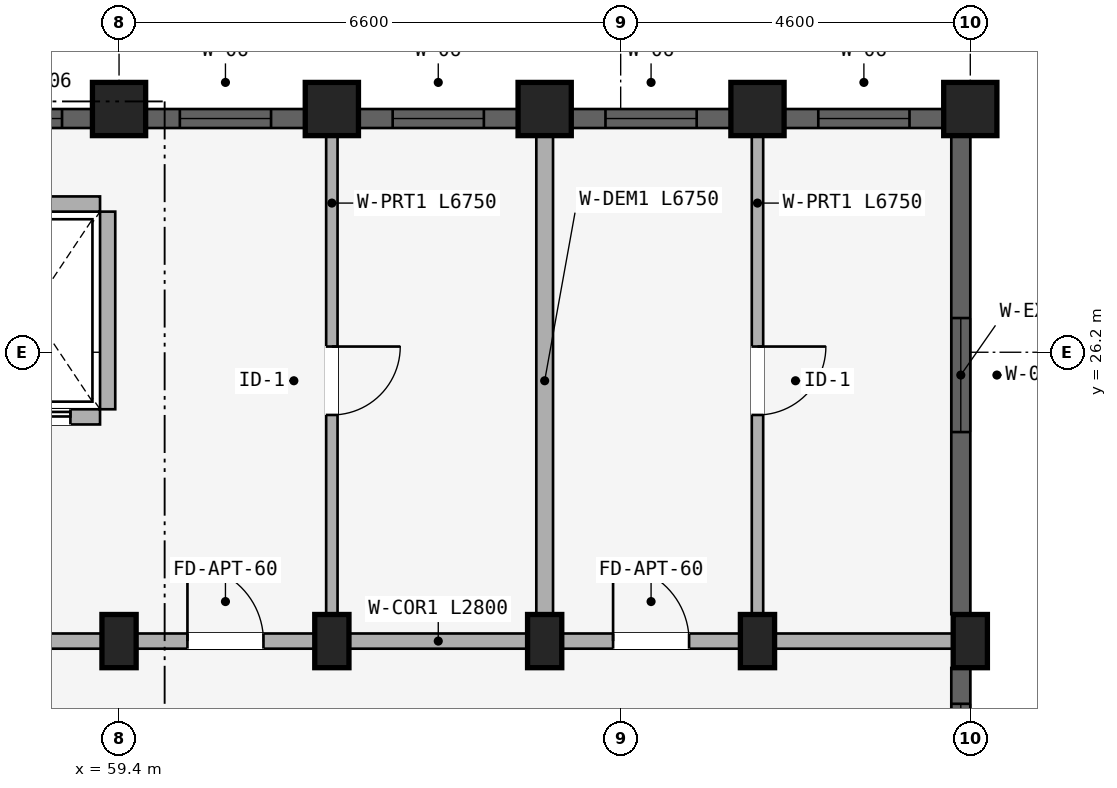
"""IFC4 building model, lengths in metres.
Left out: names, types, materials, properties, quantities, classifications, styles, units other than length and angle.
Written with IfcOpenShell. Run it as: python <this file> out.ifc"""

import sys

from ifc_helpers import new_model, si_unit, direction, frame, frame_2d, origin, origin_2d, place, context, subcontext, project, spatial, rectangle, extrude, element, fill, save


model = new_model("IFC4")
c1 = context("Model", 3, precision=1e-05, world=origin(), true_north=direction((0.0, 1.0)))
c2 = subcontext(c1, "Body", "Model", "MODEL_VIEW")
j1 = project(units=[si_unit("LENGTHUNIT", "METRE"), si_unit("PLANEANGLEUNIT", "RADIAN")], contexts=[c1])
p1 = place(None, origin())
s1 = spatial("IfcSite", under=j1, at=p1, CompositionType="ELEMENT")
p2 = place(p1, origin())
s2 = spatial("IfcBuilding", under=s1, at=p2, CompositionType="ELEMENT")
p3 = place(p2, frame((0.0, 0.0, 18.15)))
s3 = spatial("IfcBuildingStorey", under=s2, at=p3, CompositionType="ELEMENT", Elevation=18.15)
p4 = place(p3, frame((59.4, 29.4, 0.0), z_axis=(0.0, 0.0, 1.0), x_axis=(1.0, 0.0, 0.0)))
e1 = element("IfcColumn", 1, at=p4, inside=s3, PredefinedType="COLUMN", context=c2, shape_type="SweptSolid", body=[
    extrude(rectangle(XDim=0.7, YDim=0.7, at=origin_2d()), origin(), (0.0, 0.0, 1.0), 2.93),
])
p5 = place(p3, frame((59.4, 22.4, 0.0), z_axis=(0.0, 0.0, 1.0), x_axis=(1.0, 0.0, 0.0)))
e2 = element("IfcColumn", 2, at=p5, inside=s3, PredefinedType="COLUMN", context=c2, shape_type="SweptSolid", body=[
    extrude(rectangle(XDim=0.45, YDim=0.7, at=origin_2d()), origin(), (0.0, 0.0, 1.0), 2.93),
])
p6 = place(p3, frame((62.2, 29.4, 0.0), z_axis=(0.0, 0.0, 1.0), x_axis=(1.0, 0.0, 0.0)))
e3 = element("IfcColumn", 3, at=p6, inside=s3, PredefinedType="COLUMN", context=c2, shape_type="SweptSolid", body=[
    extrude(rectangle(XDim=0.7, YDim=0.7, at=origin_2d()), origin(), (0.0, 0.0, 1.0), 2.93),
])
p7 = place(p3, frame((62.2, 22.4, 0.0), z_axis=(0.0, 0.0, 1.0), x_axis=(1.0, 0.0, 0.0)))
e4 = element("IfcColumn", 4, at=p7, inside=s3, PredefinedType="COLUMN", context=c2, shape_type="SweptSolid", body=[
    extrude(rectangle(XDim=0.45, YDim=0.7, at=origin_2d()), origin(), (0.0, 0.0, 1.0), 2.93),
])
p8 = place(p3, frame((65.0, 29.4, 0.0), z_axis=(0.0, 0.0, 1.0), x_axis=(1.0, 0.0, 0.0)))
e5 = element("IfcColumn", 5, at=p8, inside=s3, PredefinedType="COLUMN", context=c2, shape_type="SweptSolid", body=[
    extrude(rectangle(XDim=0.7, YDim=0.7, at=origin_2d()), origin(), (0.0, 0.0, 1.0), 2.93),
])
p9 = place(p3, frame((65.0, 22.4, 0.0), z_axis=(0.0, 0.0, 1.0), x_axis=(1.0, 0.0, 0.0)))
e6 = element("IfcColumn", 6, at=p9, inside=s3, PredefinedType="COLUMN", context=c2, shape_type="SweptSolid", body=[
    extrude(rectangle(XDim=0.45, YDim=0.7, at=origin_2d()), origin(), (0.0, 0.0, 1.0), 2.93),
])
p10 = place(p3, frame((67.8, 29.4, 0.0), z_axis=(0.0, 0.0, 1.0), x_axis=(1.0, 0.0, 0.0)))
e7 = element("IfcColumn", 7, at=p10, inside=s3, PredefinedType="COLUMN", context=c2, shape_type="SweptSolid", body=[
    extrude(rectangle(XDim=0.7, YDim=0.7, at=origin_2d()), origin(), (0.0, 0.0, 1.0), 2.93),
])
p11 = place(p3, frame((67.8, 22.4, 0.0), z_axis=(0.0, 0.0, 1.0), x_axis=(1.0, 0.0, 0.0)))
e8 = element("IfcColumn", 8, at=p11, inside=s3, PredefinedType="COLUMN", context=c2, shape_type="SweptSolid", body=[
    extrude(rectangle(XDim=0.45, YDim=0.7, at=origin_2d()), origin(), (0.0, 0.0, 1.0), 2.93),
])
p12 = place(p3, frame((70.6, 29.4, 0.0), z_axis=(0.0, 0.0, 1.0), x_axis=(1.0, 0.0, 0.0)))
e9 = element("IfcColumn", 9, at=p12, inside=s3, PredefinedType="COLUMN", context=c2, shape_type="SweptSolid", body=[
    extrude(rectangle(XDim=0.7, YDim=0.7, at=origin_2d()), origin(), (0.0, 0.0, 1.0), 2.93),
])
p13 = place(p3, frame((70.6, 22.4, 0.0), z_axis=(0.0, 0.0, 1.0), x_axis=(1.0, 0.0, 0.0)))
e10 = element("IfcColumn", 10, at=p13, inside=s3, PredefinedType="COLUMN", context=c2, shape_type="SweptSolid", body=[
    extrude(rectangle(XDim=0.45, YDim=0.7, at=origin_2d()), origin(), (0.0, 0.0, 1.0), 2.93),
])
p14 = place(p3, frame((59.25, 28.05, 0.0), z_axis=(0.0, 0.0, 1.0), x_axis=(0.0, -1.0, 0.0)))
e11 = element("IfcWall", 11, at=p14, inside=s3, PredefinedType="STANDARD", context=c2, shape_type="SweptSolid", body=[
    extrude(rectangle(XDim=2.6, YDim=0.2, at=frame_2d((1.3, 0.0))), origin(), (0.0, 0.0, 1.0), 2.372),
])
p15 = place(p3, frame((57.35, 28.15, 0.0), z_axis=(0.0, 0.0, 1.0), x_axis=(1.0, 0.0, 0.0)))
e12 = element("IfcWall", 12, at=p15, inside=s3, PredefinedType="STANDARD", context=c2, shape_type="SweptSolid", body=[
    extrude(rectangle(XDim=1.8, YDim=0.2, at=frame_2d((0.9, 0.0))), origin(), (0.0, 0.0, 1.0), 2.93),
])
p16 = place(p3, frame((57.35, 25.35, 0.0), z_axis=(0.0, 0.0, 1.0), x_axis=(1.0, 0.0, 0.0)))
e13 = element("IfcWall", 13, at=p16, inside=s3, PredefinedType="STANDARD", context=c2, shape_type="SweptSolid", body=[
    extrude(rectangle(XDim=1.8, YDim=0.2, at=frame_2d((0.9, 0.0))), origin(), (0.0, 0.0, 1.0), 2.93),
])
p17 = place(p16, frame((0.39, 0.0, 0.0)))
e14 = element("IfcOpeningElement", 14, at=p17, cuts=e13, PredefinedType="OPENING", context=c2, shape_type="SweptSolid", body=[
    extrude(rectangle(XDim=1.02, YDim=2.15, at=frame_2d((0.51, 1.075))), frame((0.0, 0.11, 0.0), z_axis=(0.0, -1.0, 0.0), x_axis=(1.0, 0.0, 0.0)), (0.0, 0.0, 1.0), 0.22),
])
p18 = place(p3, frame((53.75, 22.4, 0.0), z_axis=(0.0, 0.0, 1.0), x_axis=(1.0, 0.0, 0.0)))
e15 = element("IfcWall", 15, at=p18, inside=s3, PredefinedType="STANDARD", context=c2, shape_type="SweptSolid", body=[
    extrude(rectangle(XDim=5.6, YDim=0.2, at=frame_2d((2.8, 0.0))), origin(), (0.0, 0.0, 1.0), 2.372),
])
p19 = place(p18, frame((1.91, 0.0, 0.0)))
e16 = element("IfcOpeningElement", 16, at=p19, cuts=e15, PredefinedType="OPENING", context=c2, shape_type="SweptSolid", body=[
    extrude(rectangle(XDim=1.22, YDim=2.15, at=frame_2d((0.61, 1.075))), frame((0.0, 0.11, 0.0), z_axis=(0.0, -1.0, 0.0), x_axis=(1.0, 0.0, 0.0)), (0.0, 0.0, 1.0), 0.22),
])
p20 = place(p3, frame((59.4, 22.4, 0.0), z_axis=(0.0, 0.0, 1.0), x_axis=(1.0, 0.0, 0.0)))
e17 = element("IfcWall", 17, at=p20, inside=s3, PredefinedType="STANDARD", context=c2, shape_type="SweptSolid", body=[
    extrude(rectangle(XDim=2.8, YDim=0.2, at=frame_2d((1.4, 0.0))), origin(), (0.0, 0.0, 1.0), 2.372),
])
p21 = place(p20, frame((0.9, 0.0, 0.0)))
e18 = element("IfcOpeningElement", 18, at=p21, cuts=e17, PredefinedType="OPENING", context=c2, shape_type="SweptSolid", body=[
    extrude(rectangle(XDim=1.0, YDim=2.15, at=frame_2d((0.5, 1.075))), frame((0.0, 0.11, 0.0), z_axis=(0.0, -1.0, 0.0), x_axis=(1.0, 0.0, 0.0)), (0.0, 0.0, 1.0), 0.22),
])
p22 = place(p3, frame((62.2, 22.4, 0.0), z_axis=(0.0, 0.0, 1.0), x_axis=(1.0, 0.0, 0.0)))
e19 = element("IfcWall", 19, at=p22, inside=s3, PredefinedType="STANDARD", context=c2, shape_type="SweptSolid", body=[
    extrude(rectangle(XDim=2.8, YDim=0.2, at=frame_2d((1.4, 0.0))), origin(), (0.0, 0.0, 1.0), 2.372),
])
p23 = place(p3, frame((65.0, 22.4, 0.0), z_axis=(0.0, 0.0, 1.0), x_axis=(1.0, 0.0, 0.0)))
e20 = element("IfcWall", 20, at=p23, inside=s3, PredefinedType="STANDARD", context=c2, shape_type="SweptSolid", body=[
    extrude(rectangle(XDim=2.8, YDim=0.2, at=frame_2d((1.4, 0.0))), origin(), (0.0, 0.0, 1.0), 2.372),
])
p24 = place(p23, frame((0.9, 0.0, 0.0)))
e21 = element("IfcOpeningElement", 21, at=p24, cuts=e20, PredefinedType="OPENING", context=c2, shape_type="SweptSolid", body=[
    extrude(rectangle(XDim=1.0, YDim=2.15, at=frame_2d((0.5, 1.075))), frame((0.0, 0.11, 0.0), z_axis=(0.0, -1.0, 0.0), x_axis=(1.0, 0.0, 0.0)), (0.0, 0.0, 1.0), 0.22),
])
p25 = place(p3, frame((67.8, 22.4, 0.0), z_axis=(0.0, 0.0, 1.0), x_axis=(1.0, 0.0, 0.0)))
e22 = element("IfcWall", 22, at=p25, inside=s3, PredefinedType="STANDARD", context=c2, shape_type="SweptSolid", body=[
    extrude(rectangle(XDim=2.8, YDim=0.2, at=frame_2d((1.4, 0.0))), origin(), (0.0, 0.0, 1.0), 2.372),
])
p26 = place(p3, frame((62.2, 29.2, 0.0), z_axis=(0.0, 0.0, 1.0), x_axis=(0.0, -1.0, 0.0)))
e23 = element("IfcWall", 23, at=p26, inside=s3, PredefinedType="PARTITIONING", context=c2, shape_type="SweptSolid", body=[
    extrude(rectangle(XDim=6.75, YDim=0.15, at=frame_2d((3.375, 0.0))), origin(), (0.0, 0.0, 1.0), 2.372),
])
p27 = place(p26, frame((2.925, 0.0, 0.0)))
e24 = element("IfcOpeningElement", 24, at=p27, cuts=e23, PredefinedType="OPENING", context=c2, shape_type="SweptSolid", body=[
    extrude(rectangle(XDim=0.9, YDim=2.1, at=frame_2d((0.45, 1.05))), frame((0.0, 0.085, 0.0), z_axis=(0.0, -1.0, 0.0), x_axis=(1.0, 0.0, 0.0)), (0.0, 0.0, 1.0), 0.17),
])
p28 = place(p3, frame((65.0, 29.2, 0.0), z_axis=(0.0, 0.0, 1.0), x_axis=(0.0, -1.0, 0.0)))
e25 = element("IfcWall", 25, at=p28, inside=s3, PredefinedType="STANDARD", context=c2, shape_type="SweptSolid", body=[
    extrude(rectangle(XDim=6.75, YDim=0.22, at=frame_2d((3.375, 0.0))), origin(), (0.0, 0.0, 1.0), 2.372),
])
p29 = place(p3, frame((67.8, 29.2, 0.0), z_axis=(0.0, 0.0, 1.0), x_axis=(0.0, -1.0, 0.0)))
e26 = element("IfcWall", 26, at=p29, inside=s3, PredefinedType="PARTITIONING", context=c2, shape_type="SweptSolid", body=[
    extrude(rectangle(XDim=6.75, YDim=0.15, at=frame_2d((3.375, 0.0))), origin(), (0.0, 0.0, 1.0), 2.372),
])
p30 = place(p29, frame((2.925, 0.0, 0.0)))
e27 = element("IfcOpeningElement", 27, at=p30, cuts=e26, PredefinedType="OPENING", context=c2, shape_type="SweptSolid", body=[
    extrude(rectangle(XDim=0.9, YDim=2.1, at=frame_2d((0.45, 1.05))), frame((0.0, 0.085, 0.0), z_axis=(0.0, -1.0, 0.0), x_axis=(1.0, 0.0, 0.0)), (0.0, 0.0, 1.0), 0.17),
])
p31 = place(p3, frame((56.628, 29.275, 0.0), z_axis=(0.0, 0.0, 1.0), x_axis=(1.0, 0.0, 0.0)))
e28 = element("IfcWall", 28, at=p31, inside=s3, PredefinedType="STANDARD", context=c2, shape_type="SweptSolid", body=[
    extrude(rectangle(XDim=2.422, YDim=0.25, at=frame_2d((1.211, 0.0))), origin(), (0.0, 0.0, 1.0), 2.472),
])
p32 = place(p31, frame((0.822, 0.0, 0.772)))
e29 = element("IfcOpeningElement", 29, at=p32, cuts=e28, PredefinedType="OPENING", context=c2, shape_type="SweptSolid", body=[
    extrude(rectangle(XDim=1.2, YDim=1.5, at=frame_2d((0.6, 0.75))), frame((0.0, 0.135, 0.0), z_axis=(0.0, -1.0, 0.0), x_axis=(1.0, 0.0, 0.0)), (0.0, 0.0, 1.0), 0.27),
])
p33 = place(p3, frame((59.753, 29.275, 0.0), z_axis=(0.0, 0.0, 1.0), x_axis=(1.0, 0.0, 0.0)))
e30 = element("IfcWall", 30, at=p33, inside=s3, PredefinedType="STANDARD", context=c2, shape_type="SweptSolid", body=[
    extrude(rectangle(XDim=2.093, YDim=0.25, at=frame_2d((1.046, 0.0))), origin(), (0.0, 0.0, 1.0), 2.472),
])
p34 = place(p33, frame((0.447, 0.0, 0.772)))
e31 = element("IfcOpeningElement", 31, at=p34, cuts=e30, PredefinedType="OPENING", context=c2, shape_type="SweptSolid", body=[
    extrude(rectangle(XDim=1.2, YDim=1.5, at=frame_2d((0.6, 0.75))), frame((0.0, 0.135, 0.0), z_axis=(0.0, -1.0, 0.0), x_axis=(1.0, 0.0, 0.0)), (0.0, 0.0, 1.0), 0.27),
])
p35 = place(p3, frame((62.553, 29.275, 0.0), z_axis=(0.0, 0.0, 1.0), x_axis=(1.0, 0.0, 0.0)))
e32 = element("IfcWall", 32, at=p35, inside=s3, PredefinedType="STANDARD", context=c2, shape_type="SweptSolid", body=[
    extrude(rectangle(XDim=2.093, YDim=0.25, at=frame_2d((1.046, 0.0))), origin(), (0.0, 0.0, 1.0), 2.472),
])
p36 = place(p35, frame((0.447, 0.0, 0.772)))
e33 = element("IfcOpeningElement", 33, at=p36, cuts=e32, PredefinedType="OPENING", context=c2, shape_type="SweptSolid", body=[
    extrude(rectangle(XDim=1.2, YDim=1.5, at=frame_2d((0.6, 0.75))), frame((0.0, 0.135, 0.0), z_axis=(0.0, -1.0, 0.0), x_axis=(1.0, 0.0, 0.0)), (0.0, 0.0, 1.0), 0.27),
])
p37 = place(p3, frame((65.354, 29.275, 0.0), z_axis=(0.0, 0.0, 1.0), x_axis=(1.0, 0.0, 0.0)))
e34 = element("IfcWall", 34, at=p37, inside=s3, PredefinedType="STANDARD", context=c2, shape_type="SweptSolid", body=[
    extrude(rectangle(XDim=2.093, YDim=0.25, at=frame_2d((1.046, 0.0))), origin(), (0.0, 0.0, 1.0), 2.472),
])
p38 = place(p37, frame((0.447, 0.0, 0.772)))
e35 = element("IfcOpeningElement", 35, at=p38, cuts=e34, PredefinedType="OPENING", context=c2, shape_type="SweptSolid", body=[
    extrude(rectangle(XDim=1.2, YDim=1.5, at=frame_2d((0.6, 0.75))), frame((0.0, 0.135, 0.0), z_axis=(0.0, -1.0, 0.0), x_axis=(1.0, 0.0, 0.0)), (0.0, 0.0, 1.0), 0.27),
])
p39 = place(p3, frame((68.154, 29.275, 0.0), z_axis=(0.0, 0.0, 1.0), x_axis=(1.0, 0.0, 0.0)))
e36 = element("IfcWall", 36, at=p39, inside=s3, PredefinedType="STANDARD", context=c2, shape_type="SweptSolid", body=[
    extrude(rectangle(XDim=2.093, YDim=0.25, at=frame_2d((1.046, 0.0))), origin(), (0.0, 0.0, 1.0), 2.472),
])
p40 = place(p39, frame((0.447, 0.0, 0.772)))
e37 = element("IfcOpeningElement", 37, at=p40, cuts=e36, PredefinedType="OPENING", context=c2, shape_type="SweptSolid", body=[
    extrude(rectangle(XDim=1.2, YDim=1.5, at=frame_2d((0.6, 0.75))), frame((0.0, 0.135, 0.0), z_axis=(0.0, -1.0, 0.0), x_axis=(1.0, 0.0, 0.0)), (0.0, 0.0, 1.0), 0.27),
])
p41 = place(p3, frame((70.475, 29.046, 0.0), z_axis=(0.0, 0.0, 1.0), x_axis=(0.0, -1.0, 0.0)))
e38 = element("IfcWall", 38, at=p41, inside=s3, PredefinedType="STANDARD", context=c2, shape_type="SweptSolid", body=[
    extrude(rectangle(XDim=6.293, YDim=0.25, at=frame_2d((3.146, 0.0))), origin(), (0.0, 0.0, 1.0), 2.372),
])
p42 = place(p41, frame((2.396, 0.0, 0.522)))
e39 = element("IfcOpeningElement", 39, at=p42, cuts=e38, PredefinedType="OPENING", context=c2, shape_type="SweptSolid", body=[
    extrude(rectangle(XDim=1.5, YDim=1.65, at=frame_2d((0.75, 0.825))), frame((0.0, 0.135, 0.0), z_axis=(0.0, -1.0, 0.0), x_axis=(1.0, 0.0, 0.0)), (0.0, 0.0, 1.0), 0.27),
])
p43 = place(p3, frame((70.475, 22.046, 0.0), z_axis=(0.0, 0.0, 1.0), x_axis=(0.0, -1.0, 0.0)))
e40 = element("IfcWall", 40, at=p43, inside=s3, PredefinedType="STANDARD", context=c2, shape_type="SweptSolid", body=[
    extrude(rectangle(XDim=1.693, YDim=0.25, at=frame_2d((0.846, 0.0))), origin(), (0.0, 0.0, 1.0), 2.372),
])
p44 = place(p43, frame((0.471, 0.0, 0.88)))
e41 = element("IfcOpeningElement", 41, at=p44, cuts=e40, PredefinedType="OPENING", context=c2, shape_type="SweptSolid", body=[
    extrude(rectangle(XDim=0.75, YDim=1.05, at=frame_2d((0.375, 0.525))), frame((0.0, 0.135, 0.0), z_axis=(0.0, -1.0, 0.0), x_axis=(1.0, 0.0, 0.0)), (0.0, 0.0, 1.0), 0.27),
])
p45 = place(p32, origin())
e42 = element("IfcWindow", 42, at=p45, inside=s3, PartitioningType="SINGLE_PANEL", PredefinedType="WINDOW", context=c2, shape_type="SweptSolid", body=[
    extrude(rectangle(XDim=1.2, YDim=1.5, at=frame_2d((0.6, 0.75))), frame((0.0, 0.03, 0.0), z_axis=(0.0, -1.0, 0.0), x_axis=(1.0, 0.0, 0.0)), (0.0, 0.0, 1.0), 0.06),
])
fill(e29, e42)
p46 = place(p34, origin())
e43 = element("IfcWindow", 43, at=p46, inside=s3, PartitioningType="SINGLE_PANEL", PredefinedType="WINDOW", context=c2, shape_type="SweptSolid", body=[
    extrude(rectangle(XDim=1.2, YDim=1.5, at=frame_2d((0.6, 0.75))), frame((0.0, 0.03, 0.0), z_axis=(0.0, -1.0, 0.0), x_axis=(1.0, 0.0, 0.0)), (0.0, 0.0, 1.0), 0.06),
])
fill(e31, e43)
p47 = place(p36, origin())
e44 = element("IfcWindow", 44, at=p47, inside=s3, PartitioningType="SINGLE_PANEL", PredefinedType="WINDOW", context=c2, shape_type="SweptSolid", body=[
    extrude(rectangle(XDim=1.2, YDim=1.5, at=frame_2d((0.6, 0.75))), frame((0.0, 0.03, 0.0), z_axis=(0.0, -1.0, 0.0), x_axis=(1.0, 0.0, 0.0)), (0.0, 0.0, 1.0), 0.06),
])
fill(e33, e44)
p48 = place(p38, origin())
e45 = element("IfcWindow", 45, at=p48, inside=s3, PartitioningType="SINGLE_PANEL", PredefinedType="WINDOW", context=c2, shape_type="SweptSolid", body=[
    extrude(rectangle(XDim=1.2, YDim=1.5, at=frame_2d((0.6, 0.75))), frame((0.0, 0.03, 0.0), z_axis=(0.0, -1.0, 0.0), x_axis=(1.0, 0.0, 0.0)), (0.0, 0.0, 1.0), 0.06),
])
fill(e35, e45)
p49 = place(p40, origin())
e46 = element("IfcWindow", 46, at=p49, inside=s3, PartitioningType="SINGLE_PANEL", PredefinedType="WINDOW", context=c2, shape_type="SweptSolid", body=[
    extrude(rectangle(XDim=1.2, YDim=1.5, at=frame_2d((0.6, 0.75))), frame((0.0, 0.03, 0.0), z_axis=(0.0, -1.0, 0.0), x_axis=(1.0, 0.0, 0.0)), (0.0, 0.0, 1.0), 0.06),
])
fill(e37, e46)
p50 = place(p42, origin())
e47 = element("IfcWindow", 47, at=p50, inside=s3, PartitioningType="DOUBLE_PANEL_VERTICAL", PredefinedType="WINDOW", context=c2, shape_type="SweptSolid", body=[
    extrude(rectangle(XDim=1.5, YDim=1.65, at=frame_2d((0.75, 0.825))), frame((0.0, 0.03, 0.0), z_axis=(0.0, -1.0, 0.0), x_axis=(1.0, 0.0, 0.0)), (0.0, 0.0, 1.0), 0.06),
])
fill(e39, e47)
p51 = place(p44, origin())
e48 = element("IfcWindow", 48, at=p51, inside=s3, PartitioningType="SINGLE_PANEL", PredefinedType="WINDOW", context=c2, shape_type="SweptSolid", body=[
    extrude(rectangle(XDim=0.75, YDim=1.05, at=frame_2d((0.375, 0.525))), frame((0.0, 0.03, 0.0), z_axis=(0.0, -1.0, 0.0), x_axis=(1.0, 0.0, 0.0)), (0.0, 0.0, 1.0), 0.06),
])
fill(e41, e48)
p52 = place(p17, origin())
e49 = element("IfcDoor", 49, at=p52, inside=s3, OperationType="SLIDING_TO_RIGHT", PredefinedType="DOOR", context=c2, shape_type="SweptSolid", body=[
    extrude(rectangle(XDim=1.02, YDim=2.15, at=frame_2d((0.51, 1.075))), frame((0.0, 0.025, 0.0), z_axis=(0.0, -1.0, 0.0), x_axis=(1.0, 0.0, 0.0)), (0.0, 0.0, 1.0), 0.05),
])
fill(e14, e49)
p53 = place(p21, frame((1.0, 0.0, 0.0), z_axis=(0.0, 0.0, 1.0), x_axis=(-1.0, 0.0, 0.0)))
e50 = element("IfcDoor", 50, at=p53, inside=s3, OperationType="SINGLE_SWING_RIGHT", PredefinedType="DOOR", context=c2, shape_type="SweptSolid", body=[
    extrude(rectangle(XDim=1.0, YDim=2.15, at=frame_2d((0.5, 1.075))), frame((0.0, 0.025, 0.0), z_axis=(0.0, -1.0, 0.0), x_axis=(1.0, 0.0, 0.0)), (0.0, 0.0, 1.0), 0.05),
])
fill(e18, e50)
p54 = place(p24, frame((1.0, 0.0, 0.0), z_axis=(0.0, 0.0, 1.0), x_axis=(-1.0, 0.0, 0.0)))
e51 = element("IfcDoor", 51, at=p54, inside=s3, OperationType="SINGLE_SWING_RIGHT", PredefinedType="DOOR", context=c2, shape_type="SweptSolid", body=[
    extrude(rectangle(XDim=1.0, YDim=2.15, at=frame_2d((0.5, 1.075))), frame((0.0, 0.025, 0.0), z_axis=(0.0, -1.0, 0.0), x_axis=(1.0, 0.0, 0.0)), (0.0, 0.0, 1.0), 0.05),
])
fill(e21, e51)
p55 = place(p27, origin())
e52 = element("IfcDoor", 52, at=p55, inside=s3, OperationType="SINGLE_SWING_LEFT", PredefinedType="DOOR", context=c2, shape_type="SweptSolid", body=[
    extrude(rectangle(XDim=0.9, YDim=2.1, at=frame_2d((0.45, 1.05))), frame((0.0, 0.025, 0.0), z_axis=(0.0, -1.0, 0.0), x_axis=(1.0, 0.0, 0.0)), (0.0, 0.0, 1.0), 0.05),
])
fill(e24, e52)
p56 = place(p30, frame((0.9, 0.0, 0.0), z_axis=(0.0, 0.0, 1.0), x_axis=(-1.0, 0.0, 0.0)))
e53 = element("IfcDoor", 53, at=p56, inside=s3, OperationType="SINGLE_SWING_RIGHT", PredefinedType="DOOR", context=c2, shape_type="SweptSolid", body=[
    extrude(rectangle(XDim=0.9, YDim=2.1, at=frame_2d((0.45, 1.05))), frame((0.0, 0.025, 0.0), z_axis=(0.0, -1.0, 0.0), x_axis=(1.0, 0.0, 0.0)), (0.0, 0.0, 1.0), 0.05),
])
fill(e27, e53)
save(model, sys.argv[1])
